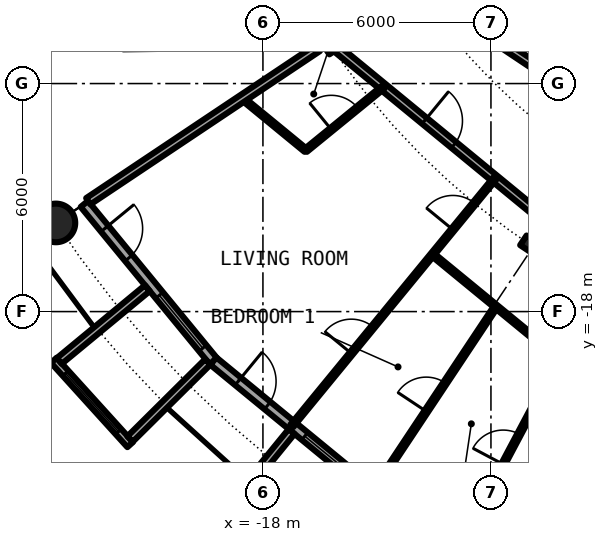
"""IFC4 building model, lengths in metres.
Left out: names, types, materials, properties, quantities, classifications, styles, units other than length and angle.
Written with IfcOpenShell. Run it as: python <this file> out.ifc"""

import sys

from ifc_helpers import new_model, si_unit, direction, frame, frame_2d, origin, origin_2d, place, context, subcontext, project, spatial, rectangle, circle, hollow_circle, i_section, extrude, element, fill, save


model = new_model("IFC4")
c1 = context("Model", 3, precision=1e-05, world=origin(), true_north=direction((0.0, 1.0)))
c2 = subcontext(c1, "Body", "Model", "MODEL_VIEW")
j1 = project(units=[si_unit("LENGTHUNIT", "METRE"), si_unit("PLANEANGLEUNIT", "RADIAN")], contexts=[c1])
p1 = place(None, origin())
s1 = spatial("IfcSite", under=j1, at=p1, CompositionType="ELEMENT")
p2 = place(p1, origin())
s2 = spatial("IfcBuilding", under=s1, at=p2, CompositionType="ELEMENT")
p3 = place(p2, frame((0.0, 0.0, 35.0)))
s3 = spatial("IfcBuildingStorey", under=s2, at=p3, CompositionType="ELEMENT", Elevation=35.0)
p4 = place(p3, frame((-23.448, -15.667, 0.0), z_axis=(0.0, 0.0, 1.0), x_axis=(1.0, 0.0, 0.0)))
e1 = element("IfcColumn", 1, at=p4, inside=s3, PredefinedType="COLUMN", context=c2, shape_type="SweptSolid", body=[
    extrude(hollow_circle(Radius=0.508, WallThickness=0.05, at=origin_2d()), origin(), (0.0, 0.0, 1.0), 3.05),
])
for number, where, z_axis, x_axis in (
    (2, (-16.297, -10.889, 0.0), (0.0, 0.0, 1.0), (-0.831, -0.556, 0.0)),
    (3, (-10.889, -16.297, 0.0), (0.0, 0.0, 1.0), (-0.556, -0.831, 0.0)),
):
    element("IfcColumn", number, at=place(p3, frame(where, z_axis=z_axis, x_axis=x_axis)), inside=s3, PredefinedType="COLUMN", context=c2, shape_type="SweptSolid", body=[
        extrude(i_section(OverallWidth=0.305, OverallDepth=0.62, WebThickness=0.021, FlangeThickness=0.04, FilletRadius=0.027, at=origin_2d()), origin(), (0.0, 0.0, 1.0), 3.05),
    ])
p5 = place(p3, frame((-22.699, -15.167, 0.0), z_axis=(0.0, 0.0, 1.0), x_axis=(0.634382322723, -0.773019449054, 0.0)))
e4 = element("IfcWall", 4, at=p5, inside=s3, PredefinedType="SOLIDWALL", context=c2, shape_type="SweptSolid", body=[
    extrude(rectangle(XDim=5.352, YDim=0.25, at=frame_2d((2.676, 0.0))), origin(), (0.0, 0.0, 1.0), 2.7),
])
p6 = place(p5, frame((0.841, 0.0, 0.0)))
e5 = element("IfcOpeningElement", 5, at=p6, cuts=e4, PredefinedType="OPENING", context=c2, shape_type="SweptSolid", body=[
    extrude(rectangle(XDim=1.0, YDim=2.2, at=frame_2d((0.5, 1.1))), frame((0.0, 0.135, 0.0), z_axis=(0.0, -1.0, 0.0), x_axis=(1.0, 0.0, 0.0)), (0.0, 0.0, 1.0), 0.27),
])
p7 = place(p5, frame((3.111, 0.0, 0.3)))
e6 = element("IfcOpeningElement", 6, at=p7, cuts=e4, PredefinedType="OPENING", context=c2, shape_type="SweptSolid", body=[
    extrude(rectangle(XDim=1.8, YDim=2.1, at=frame_2d((0.9, 1.05))), frame((0.0, 0.135, 0.0), z_axis=(0.0, -1.0, 0.0), x_axis=(1.0, 0.0, 0.0)), (0.0, 0.0, 1.0), 0.27),
])
p8 = place(p3, frame((-23.503, -19.282, -0.03), z_axis=(0.0, 0.0, 1.0), x_axis=(0.671506829416, -0.740998365753, 0.0)))
e7 = element("IfcWall", 7, at=p8, inside=s3, PredefinedType="SOLIDWALL", context=c2, shape_type="SweptSolid", body=[
    extrude(rectangle(XDim=2.993, YDim=0.2, at=frame_2d((1.497, 0.0))), origin(), (0.0, 0.0, 1.0), 2.73),
])
p9 = place(p8, frame((0.457, 0.0, 0.33)))
e8 = element("IfcOpeningElement", 8, at=p9, cuts=e7, PredefinedType="OPENING", context=c2, shape_type="SweptSolid", body=[
    extrude(circle(Radius=1.04, at=frame_2d((1.04, 1.04))), frame((0.0, 0.11, 0.0), z_axis=(0.0, -1.0, 0.0), x_axis=(1.0, 0.0, 0.0)), (0.0, 0.0, 1.0), 0.22),
])
p10 = place(p3, frame((-21.041, -17.384, -0.03), z_axis=(0.0, 0.0, 1.0), x_axis=(-0.770784861449, -0.63709551667, 0.0)))
e9 = element("IfcWall", 9, at=p10, inside=s3, PredefinedType="SOLIDWALL", context=c2, shape_type="SweptSolid", body=[
    extrude(rectangle(XDim=3.006, YDim=0.2, at=frame_2d((1.503, 0.0))), origin(), (0.0, 0.0, 1.0), 2.73),
])
p11 = place(p3, frame((-19.45, -19.323, -0.03), z_axis=(0.0, 0.0, 1.0), x_axis=(-0.709727076896, -0.704476739375, 0.0)))
e10 = element("IfcWall", 10, at=p11, inside=s3, PredefinedType="SOLIDWALL", context=c2, shape_type="SweptSolid", body=[
    extrude(rectangle(XDim=2.883, YDim=0.2, at=frame_2d((1.441, 0.0))), origin(), (0.0, 0.0, 1.0), 2.73),
])
p12 = place(p3, frame((-19.304, -19.304, 0.0), z_axis=(0.0, 0.0, 1.0), x_axis=(0.773019449054, -0.634382322723, 0.0)))
e11 = element("IfcWall", 11, at=p12, inside=s3, PredefinedType="SOLIDWALL", context=c2, shape_type="SweptSolid", body=[
    extrude(rectangle(XDim=5.352, YDim=0.25, at=frame_2d((2.676, 0.0))), origin(), (0.0, 0.0, 1.0), 2.7),
])
p13 = place(p12, frame((0.841, 0.0, 0.0)))
e12 = element("IfcOpeningElement", 12, at=p13, cuts=e11, PredefinedType="OPENING", context=c2, shape_type="SweptSolid", body=[
    extrude(rectangle(XDim=1.0, YDim=2.2, at=frame_2d((0.5, 1.1))), frame((0.0, 0.135, 0.0), z_axis=(0.0, -1.0, 0.0), x_axis=(1.0, 0.0, 0.0)), (0.0, 0.0, 1.0), 0.27),
])
p14 = place(p12, frame((3.111, 0.0, 0.3)))
e13 = element("IfcOpeningElement", 13, at=p14, cuts=e11, PredefinedType="OPENING", context=c2, shape_type="SweptSolid", body=[
    extrude(rectangle(XDim=1.8, YDim=2.1, at=frame_2d((0.9, 1.05))), frame((0.0, 0.135, 0.0), z_axis=(0.0, -1.0, 0.0), x_axis=(1.0, 0.0, 0.0)), (0.0, 0.0, 1.0), 0.27),
])
p15 = place(p3, frame((-17.246, -21.155, -0.03), z_axis=(0.0, 0.0, 1.0), x_axis=(-0.631741648902, -0.775179004516, 0.0)))
e14 = element("IfcWall", 14, at=p15, inside=s3, PredefinedType="SOLIDWALL", context=c2, shape_type="SweptSolid", body=[
    extrude(rectangle(XDim=3.006, YDim=0.2, at=frame_2d((1.503, 0.0))), origin(), (0.0, 0.0, 1.0), 2.73),
])
p16 = place(p3, frame((-18.542, -12.389, 0.0), z_axis=(0.0, 0.0, 1.0), x_axis=(0.772948171844, -0.634469166818, 0.0)))
e15 = element("IfcWall", 15, at=p16, inside=s3, PredefinedType="PARTITIONING", context=c2, shape_type="SweptSolid", body=[
    extrude(rectangle(XDim=2.158, YDim=0.1, at=frame_2d((1.079, 0.0))), origin(), (0.0, 0.0, 1.0), 2.7),
])
p17 = place(p3, frame((-13.538, -16.496, 0.0), z_axis=(0.0, 0.0, 1.0), x_axis=(0.773000340237, -0.634405606843, 0.0)))
e16 = element("IfcWall", 16, at=p17, inside=s3, PredefinedType="PARTITIONING", context=c2, shape_type="SweptSolid", body=[
    extrude(rectangle(XDim=6.474, YDim=0.1, at=frame_2d((3.237, 0.0))), origin(), (0.0, 0.0, 1.0), 2.7),
])
p18 = place(p3, frame((-16.173, -10.99, 0.0), z_axis=(0.0, 0.0, 1.0), x_axis=(0.772704887747, -0.634765434198, 0.0)))
e17 = element("IfcWall", 17, at=p18, inside=s3, PredefinedType="PARTITIONING", context=c2, shape_type="SweptSolid", body=[
    extrude(rectangle(XDim=11.209, YDim=0.2, at=frame_2d((5.604, 0.0))), origin(), (0.0, 0.0, 1.0), 2.38),
])
p19 = place(p18, frame((3.137, 0.0, 0.0)))
e18 = element("IfcOpeningElement", 18, at=p19, cuts=e17, PredefinedType="OPENING", context=c2, shape_type="SweptSolid", body=[
    extrude(rectangle(XDim=1.0, YDim=2.3, at=frame_2d((0.5, 1.15))), frame((0.0, 0.11, 0.0), z_axis=(0.0, -1.0, 0.0), x_axis=(1.0, 0.0, 0.0)), (0.0, 0.0, 1.0), 0.22),
])
p20 = place(p3, frame((-14.036, -9.402, 0.0), z_axis=(0.0, 0.0, 1.0), x_axis=(0.831561346449, -0.555432918625, 0.0)))
e19 = element("IfcWall", 19, at=p20, inside=s3, PredefinedType="PARTITIONING", context=c2, shape_type="SweptSolid", body=[
    extrude(rectangle(XDim=12.914, YDim=0.2, at=frame_2d((6.457, 0.0))), origin(), (0.0, 0.0, 1.0), 2.7),
])
p21 = place(p20, frame((7.566, 0.0, 0.0)))
e20 = element("IfcOpeningElement", 20, at=p21, cuts=e19, PredefinedType="OPENING", context=c2, shape_type="SweptSolid", body=[
    extrude(rectangle(XDim=1.0, YDim=2.3, at=frame_2d((0.5, 1.15))), frame((0.0, 0.11, 0.0), z_axis=(0.0, -1.0, 0.0), x_axis=(1.0, 0.0, 0.0)), (0.0, 0.0, 1.0), 0.22),
])
p22 = place(p3, frame((-22.596, -15.097, 0.0), z_axis=(0.0, 0.0, 1.0), x_axis=(0.831610607528, 0.555359160765, 0.0)))
e21 = element("IfcWall", 21, at=p22, inside=s3, PredefinedType="PARTITIONING", context=c2, shape_type="SweptSolid", body=[
    extrude(rectangle(XDim=7.265, YDim=0.2, at=frame_2d((3.633, 0.0))), origin(), (0.0, 0.0, 1.0), 2.7),
])
p23 = place(p3, frame((-17.24, -21.007, 0.0), z_axis=(0.0, 0.0, 1.0), x_axis=(0.634396151441, 0.77300810024, 0.0)))
e22 = element("IfcWall", 22, at=p23, inside=s3, PredefinedType="PARTITIONING", context=c2, shape_type="SweptSolid", body=[
    extrude(rectangle(XDim=8.419, YDim=0.1, at=frame_2d((4.209, 0.0))), origin(), (0.0, 0.0, 1.0), 2.7),
])
p24 = place(p23, frame((6.679, 0.0, 0.0)))
e23 = element("IfcOpeningElement", 23, at=p24, cuts=e22, PredefinedType="OPENING", context=c2, shape_type="SweptSolid", body=[
    extrude(rectangle(XDim=0.9, YDim=2.3, at=frame_2d((0.45, 1.15))), frame((0.0, 0.06, 0.0), z_axis=(0.0, -1.0, 0.0), x_axis=(1.0, 0.0, 0.0)), (0.0, 0.0, 1.0), 0.12),
])
p25 = place(p23, frame((2.468, 0.0, 0.0)))
e24 = element("IfcOpeningElement", 24, at=p25, cuts=e22, PredefinedType="OPENING", context=c2, shape_type="SweptSolid", body=[
    extrude(rectangle(XDim=0.9, YDim=2.3, at=frame_2d((0.45, 1.15))), frame((0.0, 0.06, 0.0), z_axis=(0.0, -1.0, 0.0), x_axis=(1.0, 0.0, 0.0)), (0.0, 0.0, 1.0), 0.12),
])
p26 = place(p3, frame((-16.874, -13.758, 0.0), z_axis=(0.0, 0.0, 1.0), x_axis=(0.774979608522, 0.631986239072, 0.0)))
e25 = element("IfcWall", 25, at=p26, inside=s3, PredefinedType="PARTITIONING", context=c2, shape_type="SweptSolid", body=[
    extrude(rectangle(XDim=2.636, YDim=0.1, at=frame_2d((1.318, 0.0))), origin(), (0.0, 0.0, 1.0), 2.7),
])
p27 = place(p26, frame((0.868, 0.0, 0.0)))
e26 = element("IfcOpeningElement", 26, at=p27, cuts=e25, PredefinedType="OPENING", context=c2, shape_type="SweptSolid", body=[
    extrude(rectangle(XDim=0.9, YDim=2.3, at=frame_2d((0.45, 1.15))), frame((0.0, 0.06, 0.0), z_axis=(0.0, -1.0, 0.0), x_axis=(1.0, 0.0, 0.0)), (0.0, 0.0, 1.0), 0.12),
])
p28 = place(p3, frame((-15.039, -22.634, 0.0), z_axis=(0.0, 0.0, 1.0), x_axis=(0.553440102418, 0.832888980018, 0.0)))
e27 = element("IfcWall", 27, at=p28, inside=s3, PredefinedType="PARTITIONING", context=c2, shape_type="SweptSolid", body=[
    extrude(rectangle(XDim=5.726, YDim=0.1, at=frame_2d((2.863, 0.0))), origin(), (0.0, 0.0, 1.0), 2.7),
])
p29 = place(p28, frame((2.413, 0.0, 0.0)))
e28 = element("IfcOpeningElement", 28, at=p29, cuts=e27, PredefinedType="OPENING", context=c2, shape_type="SweptSolid", body=[
    extrude(rectangle(XDim=0.9, YDim=2.3, at=frame_2d((0.45, 1.15))), frame((0.0, 0.06, 0.0), z_axis=(0.0, -1.0, 0.0), x_axis=(1.0, 0.0, 0.0)), (0.0, 0.0, 1.0), 0.12),
])
p30 = place(p3, frame((-12.734, -24.007, 0.0), z_axis=(0.0, 0.0, 1.0), x_axis=(0.468610030042, 0.883405139075, 0.0)))
e29 = element("IfcWall", 29, at=p30, inside=s3, PredefinedType="PARTITIONING", context=c2, shape_type="SweptSolid", body=[
    extrude(rectangle(XDim=5.403, YDim=0.1, at=frame_2d((2.702, 0.0))), origin(), (0.0, 0.0, 1.0), 2.7),
])
p31 = place(p30, frame((2.252, 0.0, 0.0)))
e30 = element("IfcOpeningElement", 30, at=p31, cuts=e29, PredefinedType="OPENING", context=c2, shape_type="SweptSolid", body=[
    extrude(rectangle(XDim=0.9, YDim=2.3, at=frame_2d((0.45, 1.15))), frame((0.0, 0.06, 0.0), z_axis=(0.0, -1.0, 0.0), x_axis=(1.0, 0.0, 0.0)), (0.0, 0.0, 1.0), 0.12),
])
p32 = place(p6, origin())
e31 = element("IfcDoor", 31, at=p32, inside=s3, OperationType="SINGLE_SWING_LEFT", PredefinedType="DOOR", context=c2, shape_type="SweptSolid", body=[
    extrude(rectangle(XDim=1.0, YDim=2.2, at=frame_2d((0.5, 1.1))), frame((0.0, 0.025, 0.0), z_axis=(0.0, -1.0, 0.0), x_axis=(1.0, 0.0, 0.0)), (0.0, 0.0, 1.0), 0.05),
])
fill(e5, e31)
p33 = place(p7, origin())
e32 = element("IfcWindow", 32, at=p33, inside=s3, PartitioningType="SINGLE_PANEL", PredefinedType="WINDOW", context=c2, shape_type="SweptSolid", body=[
    extrude(rectangle(XDim=1.8, YDim=2.1, at=frame_2d((0.9, 1.05))), frame((0.0, 0.03, 0.0), z_axis=(0.0, -1.0, 0.0), x_axis=(1.0, 0.0, 0.0)), (0.0, 0.0, 1.0), 0.06),
])
fill(e6, e32)
p34 = place(p9, origin())
e33 = element("IfcWindow", 33, at=p34, inside=s3, PartitioningType="SINGLE_PANEL", PredefinedType="WINDOW", context=c2, shape_type="SweptSolid", body=[
    extrude(circle(Radius=1.04, at=frame_2d((1.04, 1.04))), frame((0.0, 0.03, 0.0), z_axis=(0.0, -1.0, 0.0), x_axis=(1.0, 0.0, 0.0)), (0.0, 0.0, 1.0), 0.06),
])
fill(e8, e33)
p35 = place(p13, origin())
e34 = element("IfcDoor", 34, at=p35, inside=s3, OperationType="SINGLE_SWING_LEFT", PredefinedType="DOOR", context=c2, shape_type="SweptSolid", body=[
    extrude(rectangle(XDim=1.0, YDim=2.2, at=frame_2d((0.5, 1.1))), frame((0.0, 0.025, 0.0), z_axis=(0.0, -1.0, 0.0), x_axis=(1.0, 0.0, 0.0)), (0.0, 0.0, 1.0), 0.05),
])
fill(e12, e34)
p36 = place(p14, origin())
e35 = element("IfcWindow", 35, at=p36, inside=s3, PartitioningType="SINGLE_PANEL", PredefinedType="WINDOW", context=c2, shape_type="SweptSolid", body=[
    extrude(rectangle(XDim=1.8, YDim=2.1, at=frame_2d((0.9, 1.05))), frame((0.0, 0.03, 0.0), z_axis=(0.0, -1.0, 0.0), x_axis=(1.0, 0.0, 0.0)), (0.0, 0.0, 1.0), 0.06),
])
fill(e13, e35)
p37 = place(p19, origin())
e36 = element("IfcDoor", 36, at=p37, inside=s3, OperationType="SINGLE_SWING_LEFT", PredefinedType="DOOR", context=c2, shape_type="SweptSolid", body=[
    extrude(rectangle(XDim=1.0, YDim=2.3, at=frame_2d((0.5, 1.15))), frame((0.0, 0.025, 0.0), z_axis=(0.0, -1.0, 0.0), x_axis=(1.0, 0.0, 0.0)), (0.0, 0.0, 1.0), 0.05),
])
fill(e18, e36)
p38 = place(p27, origin())
e37 = element("IfcDoor", 37, at=p38, inside=s3, OperationType="SINGLE_SWING_LEFT", PredefinedType="DOOR", context=c2, shape_type="SweptSolid", body=[
    extrude(rectangle(XDim=0.9, YDim=2.3, at=frame_2d((0.45, 1.15))), frame((0.0, 0.025, 0.0), z_axis=(0.0, -1.0, 0.0), x_axis=(1.0, 0.0, 0.0)), (0.0, 0.0, 1.0), 0.05),
])
fill(e26, e37)
p39 = place(p24, origin())
e38 = element("IfcDoor", 38, at=p39, inside=s3, OperationType="SINGLE_SWING_RIGHT", PredefinedType="DOOR", context=c2, shape_type="SweptSolid", body=[
    extrude(rectangle(XDim=0.9, YDim=2.3, at=frame_2d((0.45, 1.15))), frame((0.0, 0.025, 0.0), z_axis=(0.0, -1.0, 0.0), x_axis=(1.0, 0.0, 0.0)), (0.0, 0.0, 1.0), 0.05),
])
fill(e23, e38)
p40 = place(p25, origin())
e39 = element("IfcDoor", 39, at=p40, inside=s3, OperationType="SINGLE_SWING_LEFT", PredefinedType="DOOR", context=c2, shape_type="SweptSolid", body=[
    extrude(rectangle(XDim=0.9, YDim=2.3, at=frame_2d((0.45, 1.15))), frame((0.0, 0.025, 0.0), z_axis=(0.0, -1.0, 0.0), x_axis=(1.0, 0.0, 0.0)), (0.0, 0.0, 1.0), 0.05),
])
fill(e24, e39)
p41 = place(p29, origin())
e40 = element("IfcDoor", 40, at=p41, inside=s3, OperationType="SINGLE_SWING_RIGHT", PredefinedType="DOOR", context=c2, shape_type="SweptSolid", body=[
    extrude(rectangle(XDim=0.9, YDim=2.3, at=frame_2d((0.45, 1.15))), frame((0.0, 0.025, 0.0), z_axis=(0.0, -1.0, 0.0), x_axis=(1.0, 0.0, 0.0)), (0.0, 0.0, 1.0), 0.05),
])
fill(e28, e40)
p42 = place(p31, origin())
e41 = element("IfcDoor", 41, at=p42, inside=s3, OperationType="SINGLE_SWING_LEFT", PredefinedType="DOOR", context=c2, shape_type="SweptSolid", body=[
    extrude(rectangle(XDim=0.9, YDim=2.3, at=frame_2d((0.45, 1.15))), frame((0.0, 0.025, 0.0), z_axis=(0.0, -1.0, 0.0), x_axis=(1.0, 0.0, 0.0)), (0.0, 0.0, 1.0), 0.05),
])
fill(e30, e41)
save(model, sys.argv[1])
